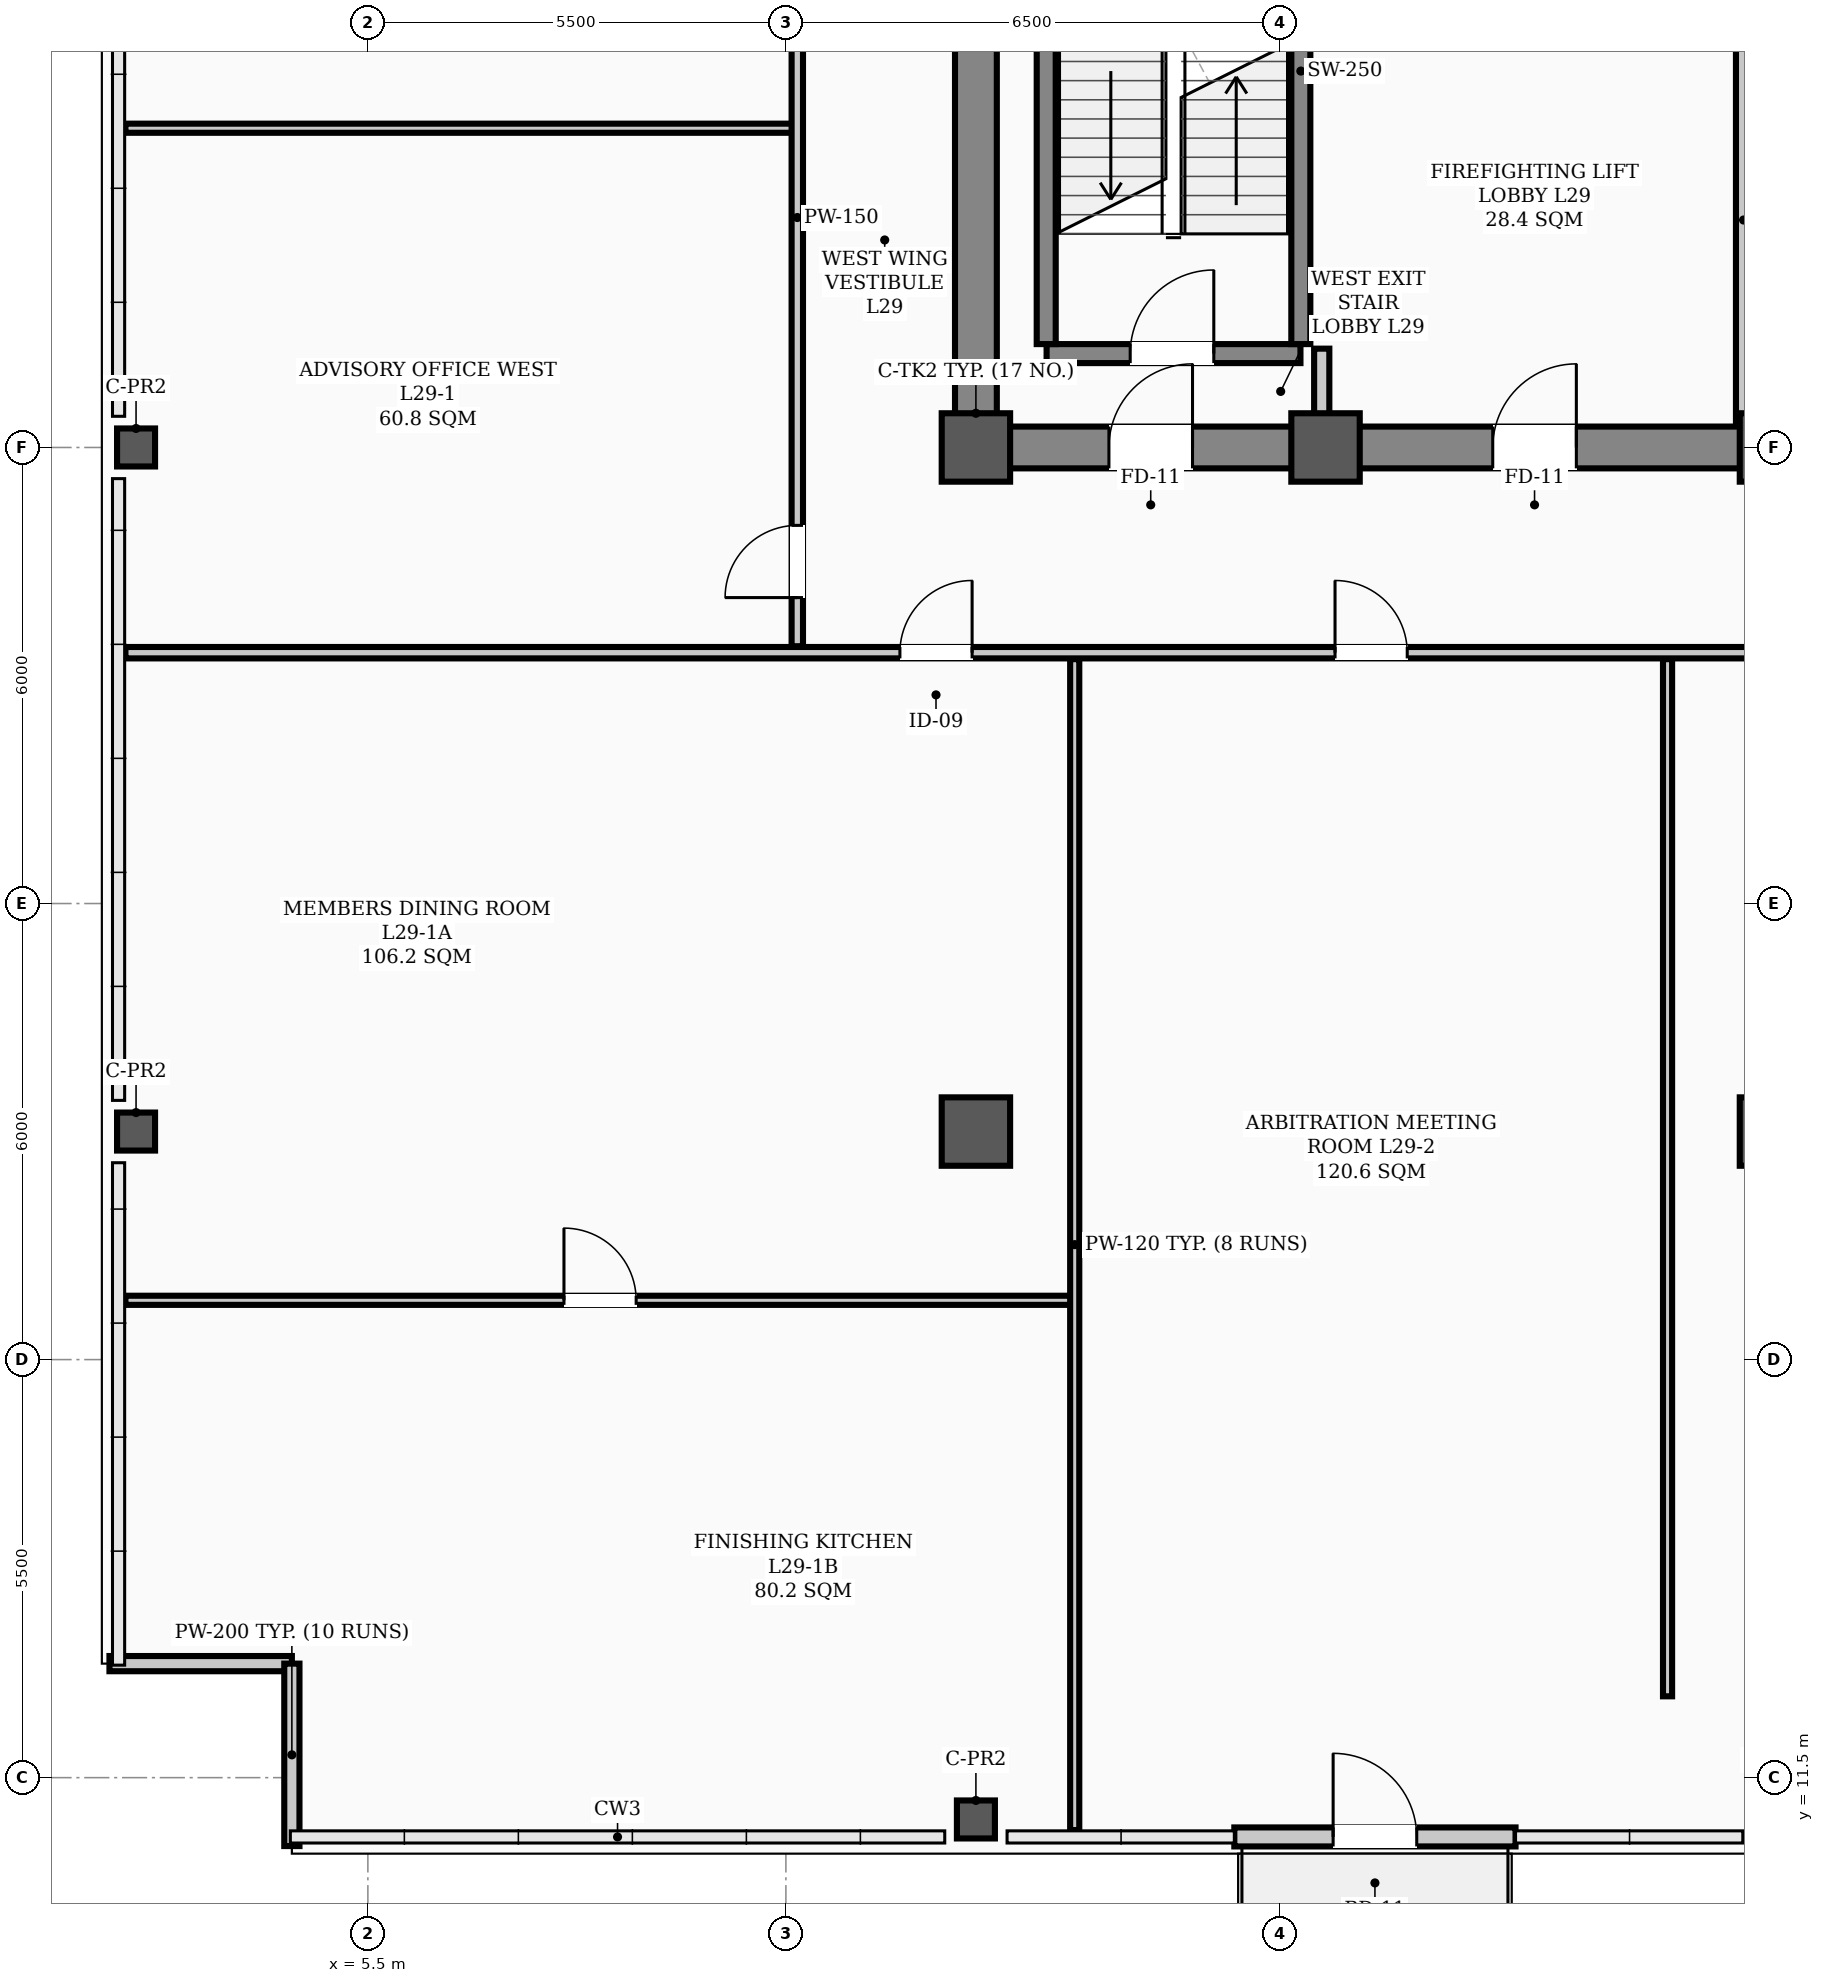
"""IFC4 building model, lengths in metres.
Left out: names, types, materials, properties, quantities, classifications, styles, units other than length and angle.
Written with IfcOpenShell. Run it as: python <this file> out.ifc"""

import sys

from ifc_helpers import new_model, si_unit, direction, frame, frame_2d, origin, origin_2d, place, context, subcontext, project, spatial, rectangle, hollow_rectangle, extrude, element, fill, save


model = new_model("IFC4")
c1 = context("Model", 3, precision=1e-05, world=origin(), true_north=direction((0.0, 1.0)))
c2 = subcontext(c1, "Body", "Model", "MODEL_VIEW")
j1 = project(units=[si_unit("LENGTHUNIT", "METRE"), si_unit("PLANEANGLEUNIT", "RADIAN")], contexts=[c1])
p1 = place(None, origin())
s1 = spatial("IfcSite", under=j1, at=p1, CompositionType="ELEMENT")
p2 = place(p1, origin())
s2 = spatial("IfcBuilding", under=s1, at=p2, CompositionType="ELEMENT")
p3 = place(p2, frame((0.0, 0.0, 118.8)))
s3 = spatial("IfcBuildingStorey", under=s2, at=p3, CompositionType="ELEMENT", Elevation=118.8)
for number, where, z_axis, x_axis in (
    (1, (13.5, 29.0, 0.0), (0.0, 0.0, 1.0), (1.0, 0.0, 0.0)),
    (2, (18.1, 29.0, 0.0), (0.0, 0.0, 1.0), (1.0, 0.0, 0.0)),
    (3, (24.0, 29.0, 0.0), (0.0, 0.0, 1.0), (1.0, 0.0, 0.0)),
    (4, (13.5, 20.0, 0.0), (0.0, 0.0, 1.0), (1.0, 0.0, 0.0)),
    (5, (24.0, 20.0, 0.0), (0.0, 0.0, 1.0), (1.0, 0.0, 0.0)),
):
    element("IfcColumn", number, at=place(p3, frame(where, z_axis=z_axis, x_axis=x_axis)), inside=s3, PredefinedType="COLUMN", context=c2, shape_type="SweptSolid", body=[
        extrude(hollow_rectangle(XDim=0.9, YDim=0.9, WallThickness=0.035, InnerFilletRadius=0.017, OuterFilletRadius=0.052, at=origin_2d()), origin(), (0.0, 0.0, 1.0), 3.9),
    ])
for number, where, z_axis, x_axis in (
    (6, (2.45, 20.0, 0.0), (0.0, 0.0, 1.0), (1.0, 0.0, 0.0)),
    (7, (2.45, 29.0, 0.0), (0.0, 0.0, 1.0), (1.0, 0.0, 0.0)),
    (8, (13.5, 10.95, 0.0), (0.0, 0.0, 1.0), (1.0, 0.0, 0.0)),
):
    element("IfcColumn", number, at=place(p3, frame(where, z_axis=z_axis, x_axis=x_axis)), inside=s3, PredefinedType="COLUMN", context=c2, shape_type="SweptSolid", body=[
        extrude(hollow_rectangle(XDim=0.5, YDim=0.5, WallThickness=0.024, InnerFilletRadius=0.012, OuterFilletRadius=0.036, at=origin_2d()), origin(), (0.0, 0.0, 1.0), 3.9),
    ])
for number, where, z_axis, x_axis in (
    (9, (2.1, 13.0, 0.0), (0.0, 0.0, 1.0), (1.0, 0.0, 0.0)),
    (10, (4.5, 13.0, 0.0), (0.0, 0.0, 1.0), (0.0, -1.0, 0.0)),
):
    element("IfcWall", number, at=place(p3, frame(where, z_axis=z_axis, x_axis=x_axis)), inside=s3, PredefinedType="PARAPET", context=c2, shape_type="SweptSolid", body=[
        extrude(rectangle(XDim=2.4, YDim=0.2, at=frame_2d((1.2, 0.0))), origin(), (0.0, 0.0, 1.0), 1.2),
    ])
p4 = place(p3, frame((16.9, 10.72, 0.0), z_axis=(0.0, 0.0, 1.0), x_axis=(1.0, 0.0, 0.0)))
e11 = element("IfcWall", 11, at=p4, inside=s3, PredefinedType="STANDARD", context=c2, shape_type="SweptSolid", body=[
    extrude(rectangle(XDim=3.7, YDim=0.25, at=frame_2d((1.85, 0.0))), origin(), (0.0, 0.0, 1.0), 3.18),
])
p5 = place(p4, frame((1.3, 0.0, 0.0)))
e12 = element("IfcOpeningElement", 12, at=p5, cuts=e11, PredefinedType="OPENING", context=c2, shape_type="SweptSolid", body=[
    extrude(rectangle(XDim=1.1, YDim=2.2, at=frame_2d((0.55, 1.1))), frame((0.0, 0.135, 0.0), z_axis=(0.0, -1.0, 0.0), x_axis=(1.0, 0.0, 0.0)), (0.0, 0.0, 1.0), 0.27),
])
p6 = place(p3, frame((13.5, 29.0, 0.0), z_axis=(0.0, 0.0, 1.0), x_axis=(1.0, 0.0, 0.0)))
e13 = element("IfcWall", 13, at=p6, inside=s3, PredefinedType="SHEAR", context=c2, shape_type="SweptSolid", body=[
    extrude(rectangle(XDim=30.5, YDim=0.55, at=frame_2d((15.25, 0.0))), origin(), (0.0, 0.0, 1.0), 3.72),
])
p7 = place(p6, frame((1.75, 0.0, 0.0)))
e14 = element("IfcOpeningElement", 14, at=p7, cuts=e13, PredefinedType="OPENING", context=c2, shape_type="SweptSolid", body=[
    extrude(rectangle(XDim=1.1, YDim=2.08, at=frame_2d((0.55, 1.04))), frame((0.0, 0.285, 0.0), z_axis=(0.0, -1.0, 0.0), x_axis=(1.0, 0.0, 0.0)), (0.0, 0.0, 1.0), 0.57),
])
p8 = place(p6, frame((26.7, 0.0, 0.0)))
e15 = element("IfcOpeningElement", 15, at=p8, cuts=e13, PredefinedType="OPENING", context=c2, shape_type="SweptSolid", body=[
    extrude(rectangle(XDim=1.1, YDim=2.08, at=frame_2d((0.55, 1.04))), frame((0.0, 0.285, 0.0), z_axis=(0.0, -1.0, 0.0), x_axis=(1.0, 0.0, 0.0)), (0.0, 0.0, 1.0), 0.57),
])
p9 = place(p6, frame((6.8, 0.0, 0.0)))
e16 = element("IfcOpeningElement", 16, at=p9, cuts=e13, PredefinedType="OPENING", context=c2, shape_type="SweptSolid", body=[
    extrude(rectangle(XDim=1.1, YDim=2.08, at=frame_2d((0.55, 1.04))), frame((0.0, 0.285, 0.0), z_axis=(0.0, -1.0, 0.0), x_axis=(1.0, 0.0, 0.0)), (0.0, 0.0, 1.0), 0.57),
])
p10 = place(p6, frame((13.2, 0.0, 0.0)))
e17 = element("IfcOpeningElement", 17, at=p10, cuts=e13, PredefinedType="OPENING", context=c2, shape_type="SweptSolid", body=[
    extrude(rectangle(XDim=1.6, YDim=2.08, at=frame_2d((0.8, 1.04))), frame((0.0, 0.285, 0.0), z_axis=(0.0, -1.0, 0.0), x_axis=(1.0, 0.0, 0.0)), (0.0, 0.0, 1.0), 0.57),
])
p11 = place(p6, frame((19.5, 0.0, 0.0)))
e18 = element("IfcOpeningElement", 18, at=p11, cuts=e13, PredefinedType="OPENING", context=c2, shape_type="SweptSolid", body=[
    extrude(rectangle(XDim=0.9, YDim=2.08, at=frame_2d((0.45, 1.04))), frame((0.0, 0.285, 0.0), z_axis=(0.0, -1.0, 0.0), x_axis=(1.0, 0.0, 0.0)), (0.0, 0.0, 1.0), 0.57),
])
p12 = place(p6, frame((21.55, 0.0, 0.0)))
e19 = element("IfcOpeningElement", 19, at=p12, cuts=e13, PredefinedType="OPENING", context=c2, shape_type="SweptSolid", body=[
    extrude(rectangle(XDim=0.9, YDim=2.08, at=frame_2d((0.45, 1.04))), frame((0.0, 0.285, 0.0), z_axis=(0.0, -1.0, 0.0), x_axis=(1.0, 0.0, 0.0)), (0.0, 0.0, 1.0), 0.57),
])
p13 = place(p3, frame((13.5, 29.35, 0.0), z_axis=(0.0, 0.0, 1.0), x_axis=(0.0, 1.0, 0.0)))
e20 = element("IfcWall", 20, at=p13, inside=s3, PredefinedType="SHEAR", context=c2, shape_type="SweptSolid", body=[
    extrude(rectangle(XDim=8.6, YDim=0.55, at=frame_2d((4.3, 0.0))), origin(), (0.0, 0.0, 1.0), 3.72),
])
p14 = place(p3, frame((14.43, 30.235, 0.0), z_axis=(0.0, 0.0, 1.0), x_axis=(1.0, 0.0, 0.0)))
e21 = element("IfcWall", 21, at=p14, inside=s3, PredefinedType="STANDARD", context=c2, shape_type="SweptSolid", body=[
    extrude(rectangle(XDim=3.34, YDim=0.25, at=frame_2d((1.67, 0.0))), origin(), (0.0, 0.0, 1.0), 3.72),
])
p15 = place(p14, frame((1.1, 0.0, 0.0)))
e22 = element("IfcOpeningElement", 22, at=p15, cuts=e21, PredefinedType="OPENING", context=c2, shape_type="SweptSolid", body=[
    extrude(rectangle(XDim=1.1, YDim=2.08, at=frame_2d((0.55, 1.04))), frame((0.0, 0.135, 0.0), z_axis=(0.0, -1.0, 0.0), x_axis=(1.0, 0.0, 0.0)), (0.0, 0.0, 1.0), 0.27),
])
for number, where, z_axis, x_axis in (
    (23, (14.425, 30.36, 0.0), (0.0, 0.0, 1.0), (0.0, 1.0, 0.0)),
    (24, (17.775, 30.36, 0.0), (0.0, 0.0, 1.0), (0.0, 1.0, 0.0)),
):
    element("IfcWall", number, at=place(p3, frame(where, z_axis=z_axis, x_axis=x_axis)), inside=s3, PredefinedType="STANDARD", context=c2, shape_type="SweptSolid", body=[
        extrude(rectangle(XDim=7.184, YDim=0.25, at=frame_2d((3.592, 0.0))), origin(), (0.0, 0.0, 1.0), 3.72),
    ])
p16 = place(p3, frame((2.31, 26.3, 0.0), z_axis=(0.0, 0.0, 1.0), x_axis=(1.0, 0.0, 0.0)))
e25 = element("IfcWall", 25, at=p16, inside=s3, PredefinedType="PARTITIONING", context=c2, shape_type="SweptSolid", body=[
    extrude(rectangle(XDim=46.38, YDim=0.15, at=frame_2d((23.19, 0.0))), origin(), (0.0, 0.0, 1.0), 3.1),
])
p17 = place(p16, frame((10.19, 0.0, 0.0)))
e26 = element("IfcOpeningElement", 26, at=p17, cuts=e25, PredefinedType="OPENING", context=c2, shape_type="SweptSolid", body=[
    extrude(rectangle(XDim=0.95, YDim=2.08, at=frame_2d((0.475, 1.04))), frame((0.0, 0.085, 0.0), z_axis=(0.0, -1.0, 0.0), x_axis=(1.0, 0.0, 0.0)), (0.0, 0.0, 1.0), 0.17),
])
p18 = place(p16, frame((15.915, 0.0, 0.0)))
e27 = element("IfcOpeningElement", 27, at=p18, cuts=e25, PredefinedType="OPENING", context=c2, shape_type="SweptSolid", body=[
    extrude(rectangle(XDim=0.95, YDim=2.08, at=frame_2d((0.475, 1.04))), frame((0.0, 0.085, 0.0), z_axis=(0.0, -1.0, 0.0), x_axis=(1.0, 0.0, 0.0)), (0.0, 0.0, 1.0), 0.17),
])
p19 = place(p16, frame((24.115, 0.0, 0.0)))
e28 = element("IfcOpeningElement", 28, at=p19, cuts=e25, PredefinedType="OPENING", context=c2, shape_type="SweptSolid", body=[
    extrude(rectangle(XDim=0.95, YDim=2.08, at=frame_2d((0.475, 1.04))), frame((0.0, 0.085, 0.0), z_axis=(0.0, -1.0, 0.0), x_axis=(1.0, 0.0, 0.0)), (0.0, 0.0, 1.0), 0.17),
])
p20 = place(p16, frame((32.515, 0.0, 0.0)))
e29 = element("IfcOpeningElement", 29, at=p20, cuts=e25, PredefinedType="OPENING", context=c2, shape_type="SweptSolid", body=[
    extrude(rectangle(XDim=0.95, YDim=2.08, at=frame_2d((0.475, 1.04))), frame((0.0, 0.085, 0.0), z_axis=(0.0, -1.0, 0.0), x_axis=(1.0, 0.0, 0.0)), (0.0, 0.0, 1.0), 0.17),
])
p21 = place(p16, frame((37.665, 0.0, 0.0)))
e30 = element("IfcOpeningElement", 30, at=p21, cuts=e25, PredefinedType="OPENING", context=c2, shape_type="SweptSolid", body=[
    extrude(rectangle(XDim=0.95, YDim=2.08, at=frame_2d((0.475, 1.04))), frame((0.0, 0.085, 0.0), z_axis=(0.0, -1.0, 0.0), x_axis=(1.0, 0.0, 0.0)), (0.0, 0.0, 1.0), 0.17),
])
p22 = place(p3, frame((2.31, 17.78, 0.0), z_axis=(0.0, 0.0, 1.0), x_axis=(1.0, 0.0, 0.0)))
e31 = element("IfcWall", 31, at=p22, inside=s3, PredefinedType="PARTITIONING", context=c2, shape_type="SweptSolid", body=[
    extrude(rectangle(XDim=12.49, YDim=0.12, at=frame_2d((6.245, 0.0))), origin(), (0.0, 0.0, 1.0), 3.1),
])
p23 = place(p22, frame((5.77, 0.0, 0.0)))
e32 = element("IfcOpeningElement", 32, at=p23, cuts=e31, PredefinedType="OPENING", context=c2, shape_type="SweptSolid", body=[
    extrude(rectangle(XDim=0.95, YDim=2.08, at=frame_2d((0.475, 1.04))), frame((0.0, 0.07, 0.0), z_axis=(0.0, -1.0, 0.0), x_axis=(1.0, 0.0, 0.0)), (0.0, 0.0, 1.0), 0.14),
])
p24 = place(p3, frame((2.31, 33.2, 0.0), z_axis=(0.0, 0.0, 1.0), x_axis=(1.0, 0.0, 0.0)))
e33 = element("IfcWall", 33, at=p24, inside=s3, PredefinedType="PARTITIONING", context=c2, shape_type="SweptSolid", body=[
    extrude(rectangle(XDim=8.84, YDim=0.12, at=frame_2d((4.42, 0.0))), origin(), (0.0, 0.0, 1.0), 3.72),
])
p25 = place(p3, frame((18.05, 29.285, 0.0), z_axis=(0.0, 0.0, 1.0), x_axis=(0.0, 1.0, 0.0)))
e34 = element("IfcWall", 34, at=p25, inside=s3, PredefinedType="STANDARD", context=c2, shape_type="SweptSolid", body=[
    extrude(rectangle(XDim=1.015, YDim=0.2, at=frame_2d((0.508, 0.0))), origin(), (0.0, 0.0, 1.0), 3.3),
])
p26 = place(p3, frame((23.6, 29.285, 0.0), z_axis=(0.0, 0.0, 1.0), x_axis=(0.0, 1.0, 0.0)))
e35 = element("IfcWall", 35, at=p26, inside=s3, PredefinedType="STANDARD", context=c2, shape_type="SweptSolid", body=[
    extrude(rectangle(XDim=5.415, YDim=0.2, at=frame_2d((2.708, 0.0))), origin(), (0.0, 0.0, 1.0), 3.1),
])
p27 = place(p3, frame((11.15, 26.385, 0.0), z_axis=(0.0, 0.0, 1.0), x_axis=(0.0, 1.0, 0.0)))
e36 = element("IfcWall", 36, at=p27, inside=s3, PredefinedType="PARTITIONING", context=c2, shape_type="SweptSolid", body=[
    extrude(rectangle(XDim=11.28, YDim=0.15, at=frame_2d((5.64, 0.0))), origin(), (0.0, 0.0, 1.0), 3.0),
])
p28 = place(p27, frame((0.64, 0.0, 0.0)))
e37 = element("IfcOpeningElement", 37, at=p28, cuts=e36, PredefinedType="OPENING", context=c2, shape_type="SweptSolid", body=[
    extrude(rectangle(XDim=0.95, YDim=2.08, at=frame_2d((0.475, 1.04))), frame((0.0, 0.085, 0.0), z_axis=(0.0, -1.0, 0.0), x_axis=(1.0, 0.0, 0.0)), (0.0, 0.0, 1.0), 0.17),
])
p29 = place(p27, frame((8.615, 0.0, 0.0)))
e38 = element("IfcOpeningElement", 38, at=p29, cuts=e36, PredefinedType="OPENING", context=c2, shape_type="SweptSolid", body=[
    extrude(rectangle(XDim=0.95, YDim=2.08, at=frame_2d((0.475, 1.04))), frame((0.0, 0.085, 0.0), z_axis=(0.0, -1.0, 0.0), x_axis=(1.0, 0.0, 0.0)), (0.0, 0.0, 1.0), 0.17),
])
p30 = place(p3, frame((14.8, 10.81, 0.0), z_axis=(0.0, 0.0, 1.0), x_axis=(0.0, 1.0, 0.0)))
e39 = element("IfcWall", 39, at=p30, inside=s3, PredefinedType="PARTITIONING", context=c2, shape_type="SweptSolid", body=[
    extrude(rectangle(XDim=15.405, YDim=0.12, at=frame_2d((7.703, 0.0))), origin(), (0.0, 0.0, 1.0), 3.0),
])
p31 = place(p3, frame((22.6, 12.57, 0.0), z_axis=(0.0, 0.0, 1.0), x_axis=(0.0, 1.0, 0.0)))
e40 = element("IfcWall", 40, at=p31, inside=s3, PredefinedType="PARTITIONING", context=c2, shape_type="SweptSolid", body=[
    extrude(rectangle(XDim=13.645, YDim=0.12, at=frame_2d((6.823, 0.0))), origin(), (0.0, 0.0, 1.0), 3.0),
])
p32 = place(p5, origin())
e41 = element("IfcDoor", 41, at=p32, inside=s3, OperationType="SINGLE_SWING_LEFT", PredefinedType="DOOR", context=c2, shape_type="SweptSolid", body=[
    extrude(rectangle(XDim=1.1, YDim=2.2, at=frame_2d((0.55, 1.1))), frame((0.0, 0.025, 0.0), z_axis=(0.0, -1.0, 0.0), x_axis=(1.0, 0.0, 0.0)), (0.0, 0.0, 1.0), 0.05),
])
fill(e12, e41)
p33 = place(p15, origin())
e42 = element("IfcDoor", 42, at=p33, inside=s3, OperationType="SINGLE_SWING_RIGHT", PredefinedType="DOOR", context=c2, shape_type="SweptSolid", body=[
    extrude(rectangle(XDim=1.1, YDim=2.08, at=frame_2d((0.55, 1.04))), frame((0.0, 0.025, 0.0), z_axis=(0.0, -1.0, 0.0), x_axis=(1.0, 0.0, 0.0)), (0.0, 0.0, 1.0), 0.05),
])
fill(e22, e42)
p34 = place(p7, origin())
e43 = element("IfcDoor", 43, at=p34, inside=s3, OperationType="SINGLE_SWING_RIGHT", PredefinedType="DOOR", context=c2, shape_type="SweptSolid", body=[
    extrude(rectangle(XDim=1.1, YDim=2.08, at=frame_2d((0.55, 1.04))), frame((0.0, 0.025, 0.0), z_axis=(0.0, -1.0, 0.0), x_axis=(1.0, 0.0, 0.0)), (0.0, 0.0, 1.0), 0.05),
])
fill(e14, e43)
p35 = place(p9, origin())
e44 = element("IfcDoor", 44, at=p35, inside=s3, OperationType="SINGLE_SWING_RIGHT", PredefinedType="DOOR", context=c2, shape_type="SweptSolid", body=[
    extrude(rectangle(XDim=1.1, YDim=2.08, at=frame_2d((0.55, 1.04))), frame((0.0, 0.025, 0.0), z_axis=(0.0, -1.0, 0.0), x_axis=(1.0, 0.0, 0.0)), (0.0, 0.0, 1.0), 0.05),
])
fill(e16, e44)
p36 = place(p23, origin())
e45 = element("IfcDoor", 45, at=p36, inside=s3, OperationType="SINGLE_SWING_LEFT", PredefinedType="DOOR", context=c2, shape_type="SweptSolid", body=[
    extrude(rectangle(XDim=0.95, YDim=2.08, at=frame_2d((0.475, 1.04))), frame((0.0, 0.025, 0.0), z_axis=(0.0, -1.0, 0.0), x_axis=(1.0, 0.0, 0.0)), (0.0, 0.0, 1.0), 0.05),
])
fill(e32, e45)
p37 = place(p17, origin())
e46 = element("IfcDoor", 46, at=p37, inside=s3, OperationType="SINGLE_SWING_RIGHT", PredefinedType="DOOR", context=c2, shape_type="SweptSolid", body=[
    extrude(rectangle(XDim=0.95, YDim=2.08, at=frame_2d((0.475, 1.04))), frame((0.0, 0.025, 0.0), z_axis=(0.0, -1.0, 0.0), x_axis=(1.0, 0.0, 0.0)), (0.0, 0.0, 1.0), 0.05),
])
fill(e26, e46)
p38 = place(p18, origin())
e47 = element("IfcDoor", 47, at=p38, inside=s3, OperationType="SINGLE_SWING_LEFT", PredefinedType="DOOR", context=c2, shape_type="SweptSolid", body=[
    extrude(rectangle(XDim=0.95, YDim=2.08, at=frame_2d((0.475, 1.04))), frame((0.0, 0.025, 0.0), z_axis=(0.0, -1.0, 0.0), x_axis=(1.0, 0.0, 0.0)), (0.0, 0.0, 1.0), 0.05),
])
fill(e27, e47)
p39 = place(p28, origin())
e48 = element("IfcDoor", 48, at=p39, inside=s3, OperationType="SINGLE_SWING_LEFT", PredefinedType="DOOR", context=c2, shape_type="SweptSolid", body=[
    extrude(rectangle(XDim=0.95, YDim=2.08, at=frame_2d((0.475, 1.04))), frame((0.0, 0.025, 0.0), z_axis=(0.0, -1.0, 0.0), x_axis=(1.0, 0.0, 0.0)), (0.0, 0.0, 1.0), 0.05),
])
fill(e37, e48)
save(model, sys.argv[1])
